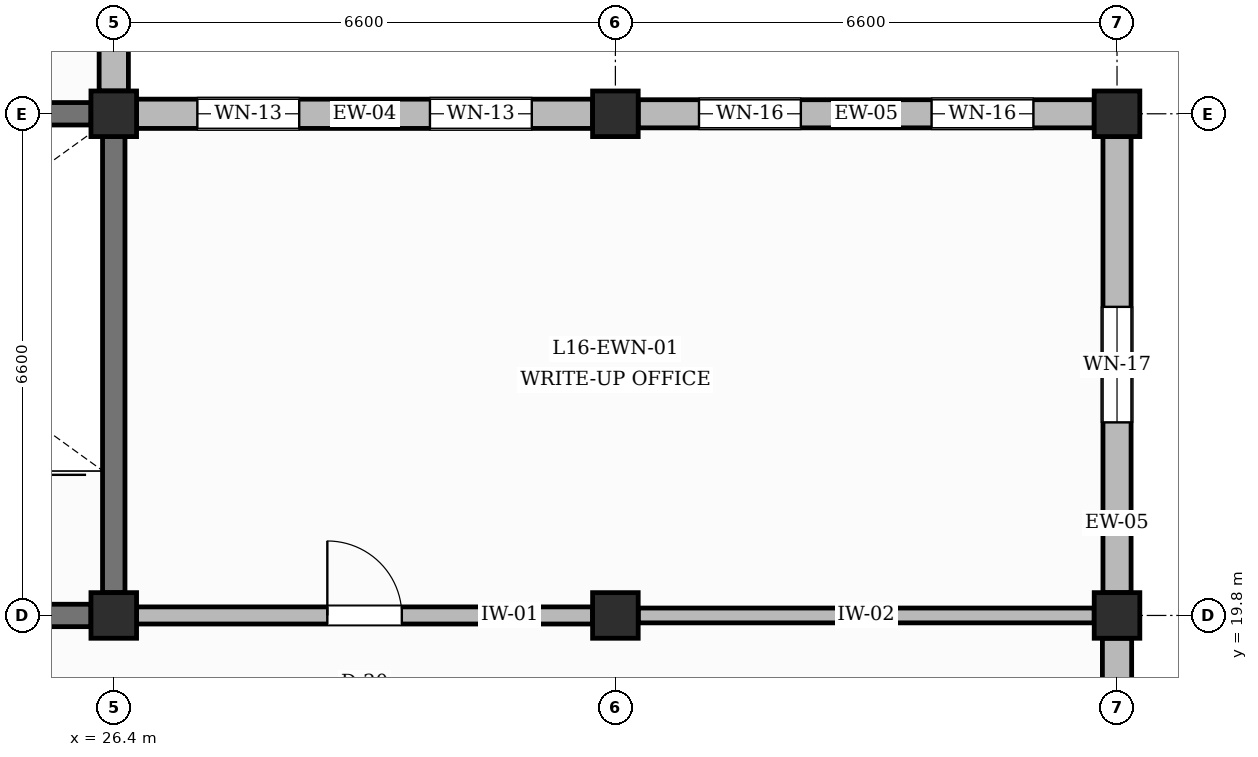
"""IFC4 building model, lengths in metres.
Left out: names, types, materials, properties, quantities, classifications, styles, units other than length and angle.
Written with IfcOpenShell. Run it as: python <this file> out.ifc"""

import sys

from ifc_helpers import new_model, si_unit, direction, frame, frame_2d, origin, origin_2d, place, context, subcontext, project, spatial, rectangle, extrude, element, fill, save


model = new_model("IFC4")
c1 = context("Model", 3, precision=1e-05, world=origin(), true_north=direction((0.0, 1.0)))
c2 = subcontext(c1, "Body", "Model", "MODEL_VIEW")
j1 = project(units=[si_unit("LENGTHUNIT", "METRE"), si_unit("PLANEANGLEUNIT", "RADIAN")], contexts=[c1])
p1 = place(None, origin())
s1 = spatial("IfcSite", under=j1, at=p1, CompositionType="ELEMENT")
p2 = place(p1, origin())
s2 = spatial("IfcBuilding", under=s1, at=p2, CompositionType="ELEMENT")
p3 = place(p2, frame((0.0, 0.0, 69.0)))
s3 = spatial("IfcBuildingStorey", under=s2, at=p3, CompositionType="ELEMENT", Elevation=69.0)
for number, where, z_axis, x_axis in (
    (1, (26.4, 19.8, 0.0), (0.0, 0.0, 1.0), (1.0, 0.0, 0.0)),
    (2, (26.4, 26.4, 0.0), (0.0, 0.0, 1.0), (1.0, 0.0, 0.0)),
    (3, (33.0, 19.8, 0.0), (0.0, 0.0, 1.0), (1.0, 0.0, 0.0)),
    (4, (33.0, 26.4, 0.0), (0.0, 0.0, 1.0), (1.0, 0.0, 0.0)),
    (5, (39.6, 19.8, 0.0), (0.0, 0.0, 1.0), (1.0, 0.0, 0.0)),
    (6, (39.6, 26.4, 0.0), (0.0, 0.0, 1.0), (1.0, 0.0, 0.0)),
):
    element("IfcColumn", number, at=place(p3, frame(where, z_axis=z_axis, x_axis=x_axis)), inside=s3, PredefinedType="COLUMN", context=c2, shape_type="SweptSolid", body=[
        extrude(rectangle(XDim=0.6, YDim=0.6, at=origin_2d()), origin(), (0.0, 0.0, 1.0), 4.2),
    ])
p4 = place(p3, frame((26.4, 26.7, 0.0), z_axis=(0.0, 0.0, 1.0), x_axis=(0.0, 1.0, 0.0)))
e7 = element("IfcWall", 7, at=p4, inside=s3, PredefinedType="SOLIDWALL", context=c2, shape_type="SweptSolid", body=[
    extrude(rectangle(XDim=6.0, YDim=0.385, at=frame_2d((3.0, 0.0))), origin(), (0.0, 0.0, 1.0), 3.32),
])
p5 = place(p4, frame((0.8, 0.0, 0.95)))
e8 = element("IfcOpeningElement", 8, at=p5, cuts=e7, PredefinedType="OPENING", context=c2, shape_type="SweptSolid", body=[
    extrude(rectangle(XDim=1.18, YDim=1.52, at=frame_2d((0.59, 0.76))), frame((0.0, 0.202, 0.0), z_axis=(0.0, -1.0, 0.0), x_axis=(1.0, 0.0, 0.0)), (0.0, 0.0, 1.0), 0.405),
])
p6 = place(p4, frame((4.02, 0.0, 0.95)))
e9 = element("IfcOpeningElement", 9, at=p6, cuts=e7, PredefinedType="OPENING", context=c2, shape_type="SweptSolid", body=[
    extrude(rectangle(XDim=1.18, YDim=1.52, at=frame_2d((0.59, 0.76))), frame((0.0, 0.202, 0.0), z_axis=(0.0, -1.0, 0.0), x_axis=(1.0, 0.0, 0.0)), (0.0, 0.0, 1.0), 0.405),
])
p7 = place(p3, frame((26.7, 26.4, 0.0), z_axis=(0.0, 0.0, 1.0), x_axis=(1.0, 0.0, 0.0)))
e10 = element("IfcWall", 10, at=p7, inside=s3, PredefinedType="SOLIDWALL", context=c2, shape_type="SweptSolid", body=[
    extrude(rectangle(XDim=6.0, YDim=0.385, at=frame_2d((3.0, 0.0))), origin(), (0.0, 0.0, 1.0), 3.32),
])
p8 = place(p7, frame((0.8, 0.0, 0.95)))
e11 = element("IfcOpeningElement", 11, at=p8, cuts=e10, PredefinedType="OPENING", context=c2, shape_type="SweptSolid", body=[
    extrude(rectangle(XDim=1.34, YDim=1.3, at=frame_2d((0.67, 0.65))), frame((0.0, 0.202, 0.0), z_axis=(0.0, -1.0, 0.0), x_axis=(1.0, 0.0, 0.0)), (0.0, 0.0, 1.0), 0.405),
])
p9 = place(p7, frame((3.86, 0.0, 0.95)))
e12 = element("IfcOpeningElement", 12, at=p9, cuts=e10, PredefinedType="OPENING", context=c2, shape_type="SweptSolid", body=[
    extrude(rectangle(XDim=1.34, YDim=1.3, at=frame_2d((0.67, 0.65))), frame((0.0, 0.202, 0.0), z_axis=(0.0, -1.0, 0.0), x_axis=(1.0, 0.0, 0.0)), (0.0, 0.0, 1.0), 0.405),
])
p10 = place(p3, frame((39.6, 13.5, 0.0), z_axis=(0.0, 0.0, 1.0), x_axis=(0.0, 1.0, 0.0)))
e13 = element("IfcWall", 13, at=p10, inside=s3, PredefinedType="SOLIDWALL", context=c2, shape_type="SweptSolid", body=[
    extrude(rectangle(XDim=6.0, YDim=0.385, at=frame_2d((3.0, 0.0))), origin(), (0.0, 0.0, 1.0), 3.32),
])
p11 = place(p10, frame((0.8, 0.0, 0.95)))
e14 = element("IfcOpeningElement", 14, at=p11, cuts=e13, PredefinedType="OPENING", context=c2, shape_type="SweptSolid", body=[
    extrude(rectangle(XDim=1.34, YDim=1.74, at=frame_2d((0.67, 0.87))), frame((0.0, 0.202, 0.0), z_axis=(0.0, -1.0, 0.0), x_axis=(1.0, 0.0, 0.0)), (0.0, 0.0, 1.0), 0.405),
])
p12 = place(p10, frame((3.86, 0.0, 0.95)))
e15 = element("IfcOpeningElement", 15, at=p12, cuts=e13, PredefinedType="OPENING", context=c2, shape_type="SweptSolid", body=[
    extrude(rectangle(XDim=1.34, YDim=1.74, at=frame_2d((0.67, 0.87))), frame((0.0, 0.202, 0.0), z_axis=(0.0, -1.0, 0.0), x_axis=(1.0, 0.0, 0.0)), (0.0, 0.0, 1.0), 0.405),
])
p13 = place(p3, frame((33.3, 26.4, 0.0), z_axis=(0.0, 0.0, 1.0), x_axis=(1.0, 0.0, 0.0)))
e16 = element("IfcWall", 16, at=p13, inside=s3, PredefinedType="SOLIDWALL", context=c2, shape_type="SweptSolid", body=[
    extrude(rectangle(XDim=6.0, YDim=0.37, at=frame_2d((3.0, 0.0))), origin(), (0.0, 0.0, 1.0), 3.32),
])
p14 = place(p13, frame((0.8, 0.0, 0.95)))
e17 = element("IfcOpeningElement", 17, at=p14, cuts=e16, PredefinedType="OPENING", context=c2, shape_type="SweptSolid", body=[
    extrude(rectangle(XDim=1.34, YDim=1.96, at=frame_2d((0.67, 0.98))), frame((0.0, 0.195, 0.0), z_axis=(0.0, -1.0, 0.0), x_axis=(1.0, 0.0, 0.0)), (0.0, 0.0, 1.0), 0.39),
])
p15 = place(p13, frame((3.86, 0.0, 0.95)))
e18 = element("IfcOpeningElement", 18, at=p15, cuts=e16, PredefinedType="OPENING", context=c2, shape_type="SweptSolid", body=[
    extrude(rectangle(XDim=1.34, YDim=1.96, at=frame_2d((0.67, 0.98))), frame((0.0, 0.195, 0.0), z_axis=(0.0, -1.0, 0.0), x_axis=(1.0, 0.0, 0.0)), (0.0, 0.0, 1.0), 0.39),
])
p16 = place(p3, frame((39.6, 20.1, 0.0), z_axis=(0.0, 0.0, 1.0), x_axis=(0.0, 1.0, 0.0)))
e19 = element("IfcWall", 19, at=p16, inside=s3, PredefinedType="SOLIDWALL", context=c2, shape_type="SweptSolid", body=[
    extrude(rectangle(XDim=6.0, YDim=0.37, at=frame_2d((3.0, 0.0))), origin(), (0.0, 0.0, 1.0), 3.32),
])
p17 = place(p16, frame((2.24, 0.0, 0.95)))
e20 = element("IfcOpeningElement", 20, at=p17, cuts=e19, PredefinedType="OPENING", context=c2, shape_type="SweptSolid", body=[
    extrude(rectangle(XDim=1.52, YDim=1.3, at=frame_2d((0.76, 0.65))), frame((0.0, 0.195, 0.0), z_axis=(0.0, -1.0, 0.0), x_axis=(1.0, 0.0, 0.0)), (0.0, 0.0, 1.0), 0.39),
])
p18 = place(p3, frame((20.1, 19.8, 0.0), z_axis=(0.0, 0.0, 1.0), x_axis=(1.0, 0.0, 0.0)))
e21 = element("IfcWall", 21, at=p18, inside=s3, PredefinedType="SHEAR", context=c2, shape_type="SweptSolid", body=[
    extrude(rectangle(XDim=6.0, YDim=0.295, at=frame_2d((3.0, 0.0))), origin(), (0.0, 0.0, 1.0), 3.56),
])
p19 = place(p18, frame((2.425, 0.0, 0.0)))
e22 = element("IfcOpeningElement", 22, at=p19, cuts=e21, PredefinedType="OPENING", context=c2, shape_type="SweptSolid", body=[
    extrude(rectangle(XDim=1.15, YDim=2.2, at=frame_2d((0.575, 1.1))), frame((0.0, 0.157, 0.0), z_axis=(0.0, -1.0, 0.0), x_axis=(1.0, 0.0, 0.0)), (0.0, 0.0, 1.0), 0.315),
])
p20 = place(p3, frame((20.1, 26.4, 0.0), z_axis=(0.0, 0.0, 1.0), x_axis=(1.0, 0.0, 0.0)))
e23 = element("IfcWall", 23, at=p20, inside=s3, PredefinedType="SHEAR", context=c2, shape_type="SweptSolid", body=[
    extrude(rectangle(XDim=6.0, YDim=0.295, at=frame_2d((3.0, 0.0))), origin(), (0.0, 0.0, 1.0), 3.56),
])
p21 = place(p3, frame((26.4, 20.1, 0.0), z_axis=(0.0, 0.0, 1.0), x_axis=(0.0, 1.0, 0.0)))
e24 = element("IfcWall", 24, at=p21, inside=s3, PredefinedType="SHEAR", context=c2, shape_type="SweptSolid", body=[
    extrude(rectangle(XDim=6.0, YDim=0.295, at=frame_2d((3.0, 0.0))), origin(), (0.0, 0.0, 1.0), 3.62),
])
p22 = place(p3, frame((26.7, 19.8, 0.0), z_axis=(0.0, 0.0, 1.0), x_axis=(1.0, 0.0, 0.0)))
e25 = element("IfcWall", 25, at=p22, inside=s3, PredefinedType="PARTITIONING", context=c2, shape_type="SweptSolid", body=[
    extrude(rectangle(XDim=6.0, YDim=0.225, at=frame_2d((3.0, 0.0))), origin(), (0.0, 0.0, 1.0), 3.56),
])
p23 = place(p22, frame((2.51, 0.0, 0.0)))
e26 = element("IfcOpeningElement", 26, at=p23, cuts=e25, PredefinedType="OPENING", context=c2, shape_type="SweptSolid", body=[
    extrude(rectangle(XDim=0.98, YDim=2.15, at=frame_2d((0.49, 1.075))), frame((0.0, 0.123, 0.0), z_axis=(0.0, -1.0, 0.0), x_axis=(1.0, 0.0, 0.0)), (0.0, 0.0, 1.0), 0.245),
])
p24 = place(p3, frame((33.3, 19.8, 0.0), z_axis=(0.0, 0.0, 1.0), x_axis=(1.0, 0.0, 0.0)))
e27 = element("IfcWall", 27, at=p24, inside=s3, PredefinedType="PARTITIONING", context=c2, shape_type="SweptSolid", body=[
    extrude(rectangle(XDim=6.0, YDim=0.195, at=frame_2d((3.0, 0.0))), origin(), (0.0, 0.0, 1.0), 3.56),
])
p25 = place(p8, origin())
e28 = element("IfcWindow", 28, at=p25, inside=s3, PartitioningType="SINGLE_PANEL", PredefinedType="WINDOW", context=c2, shape_type="SweptSolid", body=[
    extrude(rectangle(XDim=1.34, YDim=1.3, at=frame_2d((0.67, 0.65))), frame((0.0, 0.03, 0.0), z_axis=(0.0, -1.0, 0.0), x_axis=(1.0, 0.0, 0.0)), (0.0, 0.0, 1.0), 0.06),
])
fill(e11, e28)
p26 = place(p9, origin())
e29 = element("IfcWindow", 29, at=p26, inside=s3, PartitioningType="SINGLE_PANEL", PredefinedType="WINDOW", context=c2, shape_type="SweptSolid", body=[
    extrude(rectangle(XDim=1.34, YDim=1.3, at=frame_2d((0.67, 0.65))), frame((0.0, 0.03, 0.0), z_axis=(0.0, -1.0, 0.0), x_axis=(1.0, 0.0, 0.0)), (0.0, 0.0, 1.0), 0.06),
])
fill(e12, e29)
p27 = place(p14, origin())
e30 = element("IfcWindow", 30, at=p27, inside=s3, PartitioningType="SINGLE_PANEL", PredefinedType="WINDOW", context=c2, shape_type="SweptSolid", body=[
    extrude(rectangle(XDim=1.34, YDim=1.96, at=frame_2d((0.67, 0.98))), frame((0.0, 0.03, 0.0), z_axis=(0.0, -1.0, 0.0), x_axis=(1.0, 0.0, 0.0)), (0.0, 0.0, 1.0), 0.06),
])
fill(e17, e30)
p28 = place(p15, origin())
e31 = element("IfcWindow", 31, at=p28, inside=s3, PartitioningType="SINGLE_PANEL", PredefinedType="WINDOW", context=c2, shape_type="SweptSolid", body=[
    extrude(rectangle(XDim=1.34, YDim=1.96, at=frame_2d((0.67, 0.98))), frame((0.0, 0.03, 0.0), z_axis=(0.0, -1.0, 0.0), x_axis=(1.0, 0.0, 0.0)), (0.0, 0.0, 1.0), 0.06),
])
fill(e18, e31)
p29 = place(p17, origin())
e32 = element("IfcWindow", 32, at=p29, inside=s3, PartitioningType="DOUBLE_PANEL_VERTICAL", PredefinedType="WINDOW", context=c2, shape_type="SweptSolid", body=[
    extrude(rectangle(XDim=1.52, YDim=1.3, at=frame_2d((0.76, 0.65))), frame((0.0, 0.03, 0.0), z_axis=(0.0, -1.0, 0.0), x_axis=(1.0, 0.0, 0.0)), (0.0, 0.0, 1.0), 0.06),
])
fill(e20, e32)
p30 = place(p23, origin())
e33 = element("IfcDoor", 33, at=p30, inside=s3, OperationType="SINGLE_SWING_LEFT", PredefinedType="DOOR", context=c2, shape_type="SweptSolid", body=[
    extrude(rectangle(XDim=0.98, YDim=2.15, at=frame_2d((0.49, 1.075))), frame((0.0, 0.025, 0.0), z_axis=(0.0, -1.0, 0.0), x_axis=(1.0, 0.0, 0.0)), (0.0, 0.0, 1.0), 0.05),
])
fill(e26, e33)
save(model, sys.argv[1])
